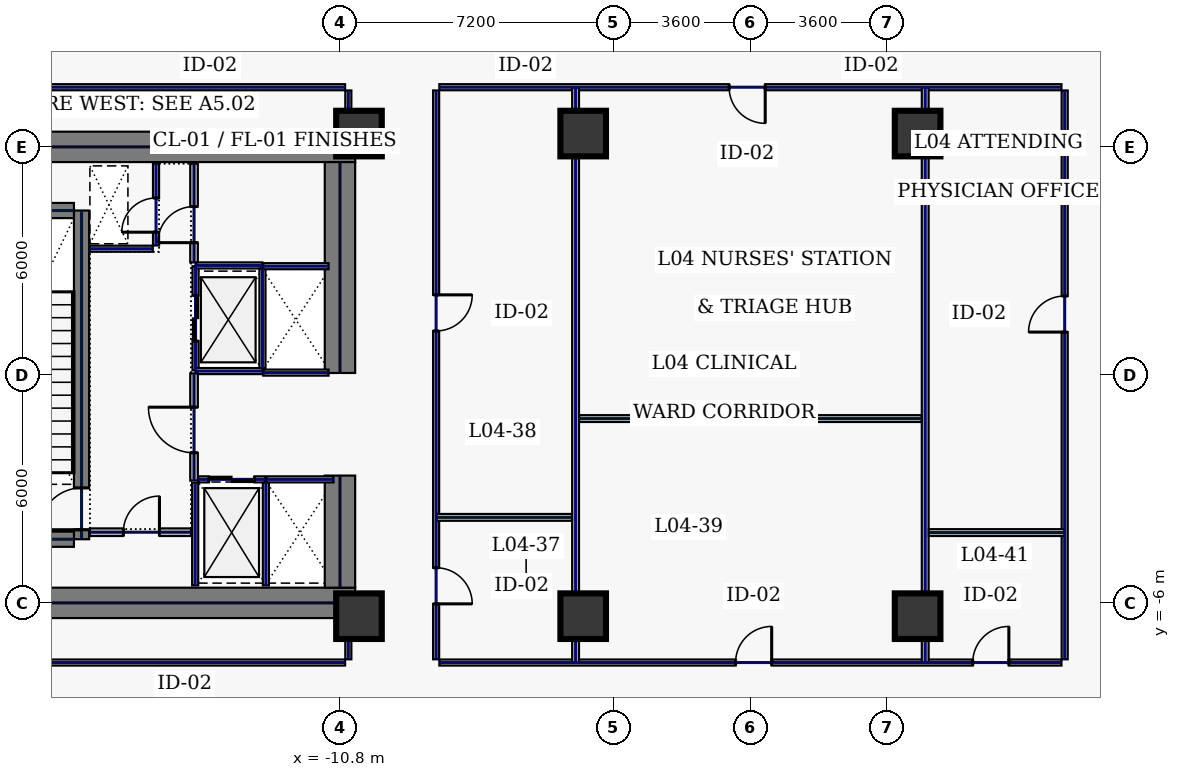
"""IFC4 building model, lengths in metres.
Left out: names, types, materials, properties, quantities, classifications, styles, units other than length and angle.
Written with IfcOpenShell. Run it as: python <this file> out.ifc"""

import sys

from ifc_helpers import new_model, si_unit, direction, frame, frame_2d, origin, origin_2d, place, context, subcontext, project, spatial, rectangle, hollow_rectangle, extrude, element, fill, save


model = new_model("IFC4")
c1 = context("Model", 3, precision=1e-05, world=origin(), true_north=direction((0.0, 1.0)))
c2 = subcontext(c1, "Body", "Model", "MODEL_VIEW")
j1 = project(units=[si_unit("LENGTHUNIT", "METRE"), si_unit("PLANEANGLEUNIT", "RADIAN")], contexts=[c1])
p1 = place(None, origin())
s1 = spatial("IfcSite", under=j1, at=p1, CompositionType="ELEMENT")
p2 = place(p1, origin())
s2 = spatial("IfcBuilding", under=s1, at=p2, CompositionType="ELEMENT")
p3 = place(p2, frame((0.0, 0.0, 23.4)))
s3 = spatial("IfcBuildingStorey", under=s2, at=p3, CompositionType="ELEMENT", Elevation=23.4)
for number, where, z_axis, x_axis in (
    (1, (-22.0, 6.0, 0.0), (0.0, 0.0, 1.0), (1.0, 0.0, 0.0)),
    (2, (-22.0, -6.0, 0.0), (0.0, 0.0, 1.0), (1.0, 0.0, 0.0)),
):
    element("IfcWall", number, at=place(p3, frame(where, z_axis=z_axis, x_axis=x_axis)), inside=s3, PredefinedType="SHEAR", context=c2, shape_type="SweptSolid", body=[
        extrude(rectangle(XDim=11.6, YDim=0.8, at=frame_2d((5.8, 0.0))), origin(), (0.0, 0.0, 1.0), 4.7),
    ])
p4 = place(p3, frame((-10.8, -5.6, 0.0), z_axis=(0.0, 0.0, 1.0), x_axis=(0.0, 1.0, 0.0)))
e3 = element("IfcWall", 3, at=p4, inside=s3, PredefinedType="SHEAR", context=c2, shape_type="SweptSolid", body=[
    extrude(rectangle(XDim=2.95, YDim=0.8, at=frame_2d((1.475, 0.0))), origin(), (0.0, 0.0, 1.0), 4.7),
])
p5 = place(p3, frame((-10.8, 0.05, 0.0), z_axis=(0.0, 0.0, 1.0), x_axis=(0.0, 1.0, 0.0)))
e4 = element("IfcWall", 4, at=p5, inside=s3, PredefinedType="SHEAR", context=c2, shape_type="SweptSolid", body=[
    extrude(rectangle(XDim=5.55, YDim=0.8, at=frame_2d((2.775, 0.0))), origin(), (0.0, 0.0, 1.0), 4.7),
])
p6 = place(p3, frame((-17.6, -4.325, 0.0), z_axis=(0.0, 0.0, 1.0), x_axis=(0.0, 1.0, 0.0)))
e5 = element("IfcWall", 5, at=p6, inside=s3, PredefinedType="SHEAR", context=c2, shape_type="SweptSolid", body=[
    extrude(rectangle(XDim=8.65, YDim=0.4, at=frame_2d((4.325, 0.0))), origin(), (0.0, 0.0, 1.0), 4.7),
])
p7 = place(p6, frame((0.25, 0.0, 0.0)))
e6 = element("IfcOpeningElement", 6, at=p7, cuts=e5, PredefinedType="OPENING", context=c2, shape_type="SweptSolid", body=[
    extrude(rectangle(XDim=1.1, YDim=2.2, at=frame_2d((0.55, 1.1))), frame((0.0, 0.21, 0.0), z_axis=(0.0, -1.0, 0.0), x_axis=(1.0, 0.0, 0.0)), (0.0, 0.0, 1.0), 0.42),
])
for number, where, z_axis, x_axis in (
    (7, (-21.2, -4.325, 0.0), (0.0, 0.0, 1.0), (1.0, 0.0, 0.0)),
    (8, (-21.2, 4.325, 0.0), (0.0, 0.0, 1.0), (1.0, 0.0, 0.0)),
):
    element("IfcWall", number, at=place(p3, frame(where, z_axis=z_axis, x_axis=x_axis)), inside=s3, PredefinedType="SHEAR", context=c2, shape_type="SweptSolid", body=[
        extrude(rectangle(XDim=3.4, YDim=0.4, at=frame_2d((1.7, 0.0))), origin(), (0.0, 0.0, 1.0), 4.7),
    ])
for number, where, z_axis, x_axis in (
    (9, (-10.3, -6.35, 0.0), (0.0, 0.0, 1.0), (1.0, 0.0, 0.0)),
    (10, (-10.3, 6.35, 0.0), (0.0, 0.0, 1.0), (1.0, 0.0, 0.0)),
    (11, (-4.4, -6.35, 0.0), (0.0, 0.0, 1.0), (1.0, 0.0, 0.0)),
    (12, (4.4, -6.35, 0.0), (0.0, 0.0, 1.0), (1.0, 0.0, 0.0)),
    (13, (-4.4, 6.35, 0.0), (0.0, 0.0, 1.0), (1.0, 0.0, 0.0)),
    (14, (4.4, 6.35, 0.0), (0.0, 0.0, 1.0), (1.0, 0.0, 0.0)),
):
    element("IfcColumn", number, at=place(p3, frame(where, z_axis=z_axis, x_axis=x_axis)), inside=s3, PredefinedType="COLUMN", context=c2, shape_type="SweptSolid", body=[
        extrude(hollow_rectangle(XDim=1.2, YDim=1.2, WallThickness=0.05, at=origin_2d()), origin(), (0.0, 0.0, 1.0), 4.7),
    ])
p8 = place(p3, frame((-14.6, 0.12, 0.0), z_axis=(0.0, 0.0, 1.0), x_axis=(0.0, 1.0, 0.0)))
e15 = element("IfcWall", 15, at=p8, inside=s3, PredefinedType="PARTITIONING", context=c2, shape_type="SweptSolid", body=[
    extrude(rectangle(XDim=2.74, YDim=0.16, at=frame_2d((1.37, 0.0))), origin(), (0.0, 0.0, 1.0), 4.7),
])
p9 = place(p8, frame((0.77, 0.0, 0.0)))
e16 = element("IfcOpeningElement", 16, at=p9, cuts=e15, PredefinedType="OPENING", context=c2, shape_type="SweptSolid", body=[
    extrude(rectangle(XDim=1.2, YDim=2.2, at=frame_2d((0.6, 1.1))), frame((0.0, 0.09, 0.0), z_axis=(0.0, -1.0, 0.0), x_axis=(1.0, 0.0, 0.0)), (0.0, 0.0, 1.0), 0.18),
])
for number, where, z_axis, x_axis in (
    (17, (-14.6, 0.1, 0.0), (0.0, 0.0, 1.0), (1.0, 0.0, 0.0)),
    (18, (-14.6, 2.88, 0.0), (0.0, 0.0, 1.0), (1.0, 0.0, 0.0)),
):
    element("IfcWall", number, at=place(p3, frame(where, z_axis=z_axis, x_axis=x_axis)), inside=s3, PredefinedType="PARTITIONING", context=c2, shape_type="SweptSolid", body=[
        extrude(rectangle(XDim=1.76, YDim=0.16, at=frame_2d((0.88, 0.0))), origin(), (0.0, 0.0, 1.0), 4.7),
    ])
p10 = place(p3, frame((-12.84, 0.18, 0.0), z_axis=(0.0, 0.0, 1.0), x_axis=(0.0, 1.0, 0.0)))
e19 = element("IfcWall", 19, at=p10, inside=s3, PredefinedType="PARTITIONING", context=c2, shape_type="SweptSolid", body=[
    extrude(rectangle(XDim=2.62, YDim=0.16, at=frame_2d((1.31, 0.0))), origin(), (0.0, 0.0, 1.0), 4.7),
])
p11 = place(p3, frame((-14.53, -2.75, 0.0), z_axis=(0.0, 0.0, 1.0), x_axis=(1.0, 0.0, 0.0)))
e20 = element("IfcWall", 20, at=p11, inside=s3, PredefinedType="PARTITIONING", context=c2, shape_type="SweptSolid", body=[
    extrude(rectangle(XDim=1.76, YDim=0.16, at=frame_2d((0.88, 0.0))), origin(), (0.0, 0.0, 1.0), 4.7),
])
p12 = place(p11, frame((0.28, 0.0, 0.0)))
e21 = element("IfcOpeningElement", 21, at=p12, cuts=e20, PredefinedType="OPENING", context=c2, shape_type="SweptSolid", body=[
    extrude(rectangle(XDim=1.2, YDim=2.2, at=frame_2d((0.6, 1.1))), frame((0.0, 0.09, 0.0), z_axis=(0.0, -1.0, 0.0), x_axis=(1.0, 0.0, 0.0)), (0.0, 0.0, 1.0), 0.18),
])
for number, where, z_axis, x_axis in (
    (22, (-12.75, -5.54, 0.0), (0.0, 0.0, 1.0), (0.0, 1.0, 0.0)),
    (23, (-14.61, -5.54, 0.0), (0.0, 0.0, 1.0), (0.0, 1.0, 0.0)),
):
    element("IfcWall", number, at=place(p3, frame(where, z_axis=z_axis, x_axis=x_axis)), inside=s3, PredefinedType="PARTITIONING", context=c2, shape_type="SweptSolid", body=[
        extrude(rectangle(XDim=2.7, YDim=0.16, at=frame_2d((1.35, 0.0))), origin(), (0.0, 0.0, 1.0), 4.7),
    ])
p13 = place(p3, frame((-12.73, -2.75, 0.0), z_axis=(0.0, 0.0, 1.0), x_axis=(1.0, 0.0, 0.0)))
e24 = element("IfcWall", 24, at=p13, inside=s3, PredefinedType="PARTITIONING", context=c2, shape_type="SweptSolid", body=[
    extrude(rectangle(XDim=1.76, YDim=0.16, at=frame_2d((0.88, 0.0))), origin(), (0.0, 0.0, 1.0), 4.7),
])
for number, where, z_axis, x_axis in (
    (25, (-12.82, 0.06, 0.0), (0.0, 0.0, 1.0), (1.0, 0.0, 0.0)),
    (26, (-12.82, 2.86, 0.0), (0.0, 0.0, 1.0), (1.0, 0.0, 0.0)),
):
    element("IfcWall", number, at=place(p3, frame(where, z_axis=z_axis, x_axis=x_axis)), inside=s3, PredefinedType="PARTITIONING", context=c2, shape_type="SweptSolid", body=[
        extrude(rectangle(XDim=1.72, YDim=0.16, at=frame_2d((0.86, 0.0))), origin(), (0.0, 0.0, 1.0), 4.7),
    ])
p14 = place(p3, frame((-15.64, 3.405, 0.0), z_axis=(0.0, 0.0, 1.0), x_axis=(0.0, 1.0, 0.0)))
e27 = element("IfcWall", 27, at=p14, inside=s3, PredefinedType="PARTITIONING", context=c2, shape_type="SweptSolid", body=[
    extrude(rectangle(XDim=2.155, YDim=0.16, at=frame_2d((1.078, 0.0))), origin(), (0.0, 0.0, 1.0), 4.7),
])
p15 = place(p14, frame((0.35, 0.0, 0.0)))
e28 = element("IfcOpeningElement", 28, at=p15, cuts=e27, PredefinedType="OPENING", context=c2, shape_type="SweptSolid", body=[
    extrude(rectangle(XDim=0.9, YDim=2.2, at=frame_2d((0.45, 1.1))), frame((0.0, 0.09, 0.0), z_axis=(0.0, -1.0, 0.0), x_axis=(1.0, 0.0, 0.0)), (0.0, 0.0, 1.0), 0.18),
])
p16 = place(p3, frame((-17.38, 3.32, 0.0), z_axis=(0.0, 0.0, 1.0), x_axis=(1.0, 0.0, 0.0)))
e29 = element("IfcWall", 29, at=p16, inside=s3, PredefinedType="PARTITIONING", context=c2, shape_type="SweptSolid", body=[
    extrude(rectangle(XDim=1.655, YDim=0.16, at=frame_2d((0.827, 0.0))), origin(), (0.0, 0.0, 1.0), 4.7),
])
p17 = place(p3, frame((-17.38, -4.14, 0.0), z_axis=(0.0, 0.0, 1.0), x_axis=(1.0, 0.0, 0.0)))
e30 = element("IfcWall", 30, at=p17, inside=s3, PredefinedType="SOLIDWALL", context=c2, shape_type="SweptSolid", body=[
    extrude(rectangle(XDim=2.66, YDim=0.2, at=frame_2d((1.33, 0.0))), origin(), (0.0, 0.0, 1.0), 4.7),
])
p18 = place(p17, frame((0.88, 0.0, 0.0)))
e31 = element("IfcOpeningElement", 31, at=p18, cuts=e30, PredefinedType="OPENING", context=c2, shape_type="SweptSolid", body=[
    extrude(rectangle(XDim=0.95, YDim=2.2, at=frame_2d((0.475, 1.1))), frame((0.0, 0.11, 0.0), z_axis=(0.0, -1.0, 0.0), x_axis=(1.0, 0.0, 0.0)), (0.0, 0.0, 1.0), 0.22),
])
p19 = place(p3, frame((-14.64, 2.96, 0.0), z_axis=(0.0, 0.0, 1.0), x_axis=(0.0, 1.0, 0.0)))
e32 = element("IfcWall", 32, at=p19, inside=s3, PredefinedType="SOLIDWALL", context=c2, shape_type="SweptSolid", body=[
    extrude(rectangle(XDim=2.6, YDim=0.2, at=frame_2d((1.3, 0.0))), origin(), (0.0, 0.0, 1.0), 4.7),
])
p20 = place(p19, frame((0.52, 0.0, 0.0)))
e33 = element("IfcOpeningElement", 33, at=p20, cuts=e32, PredefinedType="OPENING", context=c2, shape_type="SweptSolid", body=[
    extrude(rectangle(XDim=0.95, YDim=2.2, at=frame_2d((0.475, 1.1))), frame((0.0, 0.11, 0.0), z_axis=(0.0, -1.0, 0.0), x_axis=(1.0, 0.0, 0.0)), (0.0, 0.0, 1.0), 0.22),
])
p21 = place(p3, frame((-14.64, -2.78, 0.0), z_axis=(0.0, 0.0, 1.0), x_axis=(0.0, 1.0, 0.0)))
e34 = element("IfcWall", 34, at=p21, inside=s3, PredefinedType="SOLIDWALL", context=c2, shape_type="SweptSolid", body=[
    extrude(rectangle(XDim=2.82, YDim=0.2, at=frame_2d((1.41, 0.0))), origin(), (0.0, 0.0, 1.0), 4.7),
])
p22 = place(p21, frame((0.73, 0.0, 0.0)))
e35 = element("IfcOpeningElement", 35, at=p22, cuts=e34, PredefinedType="OPENING", context=c2, shape_type="SweptSolid", body=[
    extrude(rectangle(XDim=1.2, YDim=2.2, at=frame_2d((0.6, 1.1))), frame((0.0, 0.11, 0.0), z_axis=(0.0, -1.0, 0.0), x_axis=(1.0, 0.0, 0.0)), (0.0, 0.0, 1.0), 0.22),
])
p23 = place(p3, frame((8.185, 7.57, 0.0), z_axis=(0.0, 0.0, 1.0), x_axis=(-1.0, 0.0, 0.0)))
e36 = element("IfcWall", 36, at=p23, inside=s3, PredefinedType="PARTITIONING", context=c2, shape_type="SweptSolid", body=[
    extrude(rectangle(XDim=16.37, YDim=0.16, at=frame_2d((8.185, 0.0))), origin(), (0.0, 0.0, 1.0), 4.7),
])
p24 = place(p23, frame((7.795, 0.0, 0.0)))
e37 = element("IfcOpeningElement", 37, at=p24, cuts=e36, PredefinedType="OPENING", context=c2, shape_type="SweptSolid", body=[
    extrude(rectangle(XDim=0.95, YDim=2.2, at=frame_2d((0.475, 1.1))), frame((0.0, 0.09, 0.0), z_axis=(0.0, -1.0, 0.0), x_axis=(1.0, 0.0, 0.0)), (0.0, 0.0, 1.0), 0.18),
])
p25 = place(p3, frame((-8.27, 7.485, 0.0), z_axis=(0.0, 0.0, 1.0), x_axis=(0.0, -1.0, 0.0)))
e38 = element("IfcWall", 38, at=p25, inside=s3, PredefinedType="PARTITIONING", context=c2, shape_type="SweptSolid", body=[
    extrude(rectangle(XDim=14.97, YDim=0.16, at=frame_2d((7.485, 0.0))), origin(), (0.0, 0.0, 1.0), 4.7),
])
p26 = place(p25, frame((12.561, 0.0, 0.0)))
e39 = element("IfcOpeningElement", 39, at=p26, cuts=e38, PredefinedType="OPENING", context=c2, shape_type="SweptSolid", body=[
    extrude(rectangle(XDim=0.95, YDim=2.2, at=frame_2d((0.475, 1.1))), frame((0.0, 0.09, 0.0), z_axis=(0.0, -1.0, 0.0), x_axis=(1.0, 0.0, 0.0)), (0.0, 0.0, 1.0), 0.18),
])
p27 = place(p25, frame((5.379, 0.0, 0.0)))
e40 = element("IfcOpeningElement", 40, at=p27, cuts=e38, PredefinedType="OPENING", context=c2, shape_type="SweptSolid", body=[
    extrude(rectangle(XDim=0.95, YDim=2.2, at=frame_2d((0.475, 1.1))), frame((0.0, 0.09, 0.0), z_axis=(0.0, -1.0, 0.0), x_axis=(1.0, 0.0, 0.0)), (0.0, 0.0, 1.0), 0.18),
])
p28 = place(p3, frame((-8.185, -7.57, 0.0), z_axis=(0.0, 0.0, 1.0), x_axis=(1.0, 0.0, 0.0)))
e41 = element("IfcWall", 41, at=p28, inside=s3, PredefinedType="PARTITIONING", context=c2, shape_type="SweptSolid", body=[
    extrude(rectangle(XDim=16.37, YDim=0.16, at=frame_2d((8.185, 0.0))), origin(), (0.0, 0.0, 1.0), 4.7),
])
p29 = place(p28, frame((7.795, 0.0, 0.0)))
e42 = element("IfcOpeningElement", 42, at=p29, cuts=e41, PredefinedType="OPENING", context=c2, shape_type="SweptSolid", body=[
    extrude(rectangle(XDim=0.95, YDim=2.2, at=frame_2d((0.475, 1.1))), frame((0.0, 0.09, 0.0), z_axis=(0.0, -1.0, 0.0), x_axis=(1.0, 0.0, 0.0)), (0.0, 0.0, 1.0), 0.18),
])
p30 = place(p28, frame((14.036, 0.0, 0.0)))
e43 = element("IfcOpeningElement", 43, at=p30, cuts=e41, PredefinedType="OPENING", context=c2, shape_type="SweptSolid", body=[
    extrude(rectangle(XDim=0.95, YDim=2.2, at=frame_2d((0.475, 1.1))), frame((0.0, 0.09, 0.0), z_axis=(0.0, -1.0, 0.0), x_axis=(1.0, 0.0, 0.0)), (0.0, 0.0, 1.0), 0.18),
])
p31 = place(p3, frame((8.27, -7.485, 0.0), z_axis=(0.0, 0.0, 1.0), x_axis=(0.0, 1.0, 0.0)))
e44 = element("IfcWall", 44, at=p31, inside=s3, PredefinedType="PARTITIONING", context=c2, shape_type="SweptSolid", body=[
    extrude(rectangle(XDim=14.97, YDim=0.16, at=frame_2d((7.485, 0.0))), origin(), (0.0, 0.0, 1.0), 4.7),
])
p32 = place(p31, frame((8.611, 0.0, 0.0)))
e45 = element("IfcOpeningElement", 45, at=p32, cuts=e44, PredefinedType="OPENING", context=c2, shape_type="SweptSolid", body=[
    extrude(rectangle(XDim=0.95, YDim=2.2, at=frame_2d((0.475, 1.1))), frame((0.0, 0.09, 0.0), z_axis=(0.0, -1.0, 0.0), x_axis=(1.0, 0.0, 0.0)), (0.0, 0.0, 1.0), 0.18),
])
for number, where, z_axis, x_axis in (
    (46, (-10.58, -7.485, 0.0), (0.0, 0.0, 1.0), (0.0, 1.0, 0.0)),
    (47, (-10.58, 6.42, 0.0), (0.0, 0.0, 1.0), (0.0, 1.0, 0.0)),
):
    element("IfcWall", number, at=place(p3, frame(where, z_axis=z_axis, x_axis=x_axis)), inside=s3, PredefinedType="PARTITIONING", context=c2, shape_type="SweptSolid", body=[
        extrude(rectangle(XDim=1.065, YDim=0.16, at=frame_2d((0.533, 0.0))), origin(), (0.0, 0.0, 1.0), 4.7),
    ])
for number, where, z_axis, x_axis in (
    (48, (-10.665, 7.57, 0.0), (0.0, 0.0, 1.0), (-1.0, 0.0, 0.0)),
    (49, (-27.185, -7.57, 0.0), (0.0, 0.0, 1.0), (1.0, 0.0, 0.0)),
):
    element("IfcWall", number, at=place(p3, frame(where, z_axis=z_axis, x_axis=x_axis)), inside=s3, PredefinedType="PARTITIONING", context=c2, shape_type="SweptSolid", body=[
        extrude(rectangle(XDim=16.52, YDim=0.16, at=frame_2d((8.26, 0.0))), origin(), (0.0, 0.0, 1.0), 4.7),
    ])
for number, where, z_axis, x_axis in (
    (50, (-4.6, -7.565, 0.0), (0.0, 0.0, 1.0), (0.0, 1.0, 0.0)),
    (51, (4.6, -7.565, 0.0), (0.0, 0.0, 1.0), (0.0, 1.0, 0.0)),
):
    element("IfcWall", number, at=place(p3, frame(where, z_axis=z_axis, x_axis=x_axis)), inside=s3, PredefinedType="PARTITIONING", context=c2, shape_type="SweptSolid", body=[
        extrude(rectangle(XDim=15.13, YDim=0.18, at=frame_2d((7.565, 0.0))), origin(), (0.0, 0.0, 1.0), 3.895),
    ])
p33 = place(p3, frame((-4.505, -1.15, 0.0), z_axis=(0.0, 0.0, 1.0), x_axis=(1.0, 0.0, 0.0)))
e52 = element("IfcWall", 52, at=p33, inside=s3, PredefinedType="PARTITIONING", context=c2, shape_type="SweptSolid", body=[
    extrude(rectangle(XDim=9.01, YDim=0.18, at=frame_2d((4.505, 0.0))), origin(), (0.0, 0.0, 1.0), 4.7),
])
for number, where, z_axis, x_axis in (
    (53, (-8.265, -3.75, 0.0), (0.0, 0.0, 1.0), (1.0, 0.0, 0.0)),
    (54, (4.695, -4.15, 0.0), (0.0, 0.0, 1.0), (1.0, 0.0, 0.0)),
):
    element("IfcWall", number, at=place(p3, frame(where, z_axis=z_axis, x_axis=x_axis)), inside=s3, PredefinedType="PARTITIONING", context=c2, shape_type="SweptSolid", body=[
        extrude(rectangle(XDim=3.57, YDim=0.18, at=frame_2d((1.785, 0.0))), origin(), (0.0, 0.0, 1.0), 4.7),
    ])
p34 = place(p7, origin())
e55 = element("IfcDoor", 55, at=p34, inside=s3, OperationType="SINGLE_SWING_LEFT", PredefinedType="DOOR", context=c2, shape_type="SweptSolid", body=[
    extrude(rectangle(XDim=1.1, YDim=2.2, at=frame_2d((0.55, 1.1))), frame((0.0, 0.025, 0.0), z_axis=(0.0, -1.0, 0.0), x_axis=(1.0, 0.0, 0.0)), (0.0, 0.0, 1.0), 0.05),
])
fill(e6, e55)
p35 = place(p9, origin())
e56 = element("IfcDoor", 56, at=p35, inside=s3, OperationType="SLIDING_TO_LEFT", PredefinedType="DOOR", context=c2, shape_type="SweptSolid", body=[
    extrude(rectangle(XDim=1.2, YDim=2.2, at=frame_2d((0.6, 1.1))), frame((0.0, 0.025, 0.0), z_axis=(0.0, -1.0, 0.0), x_axis=(1.0, 0.0, 0.0)), (0.0, 0.0, 1.0), 0.05),
])
fill(e16, e56)
p36 = place(p12, origin())
e57 = element("IfcDoor", 57, at=p36, inside=s3, OperationType="SLIDING_TO_LEFT", PredefinedType="DOOR", context=c2, shape_type="SweptSolid", body=[
    extrude(rectangle(XDim=1.2, YDim=2.2, at=frame_2d((0.6, 1.1))), frame((0.0, 0.025, 0.0), z_axis=(0.0, -1.0, 0.0), x_axis=(1.0, 0.0, 0.0)), (0.0, 0.0, 1.0), 0.05),
])
fill(e21, e57)
p37 = place(p15, origin())
e58 = element("IfcDoor", 58, at=p37, inside=s3, OperationType="SINGLE_SWING_LEFT", PredefinedType="DOOR", context=c2, shape_type="SweptSolid", body=[
    extrude(rectangle(XDim=0.9, YDim=2.2, at=frame_2d((0.45, 1.1))), frame((0.0, 0.025, 0.0), z_axis=(0.0, -1.0, 0.0), x_axis=(1.0, 0.0, 0.0)), (0.0, 0.0, 1.0), 0.05),
])
fill(e28, e58)
p38 = place(p18, origin())
e59 = element("IfcDoor", 59, at=p38, inside=s3, OperationType="SINGLE_SWING_RIGHT", PredefinedType="DOOR", context=c2, shape_type="SweptSolid", body=[
    extrude(rectangle(XDim=0.95, YDim=2.2, at=frame_2d((0.475, 1.1))), frame((0.0, 0.025, 0.0), z_axis=(0.0, -1.0, 0.0), x_axis=(1.0, 0.0, 0.0)), (0.0, 0.0, 1.0), 0.05),
])
fill(e31, e59)
p39 = place(p20, origin())
e60 = element("IfcDoor", 60, at=p39, inside=s3, OperationType="SINGLE_SWING_LEFT", PredefinedType="DOOR", context=c2, shape_type="SweptSolid", body=[
    extrude(rectangle(XDim=0.95, YDim=2.2, at=frame_2d((0.475, 1.1))), frame((0.0, 0.025, 0.0), z_axis=(0.0, -1.0, 0.0), x_axis=(1.0, 0.0, 0.0)), (0.0, 0.0, 1.0), 0.05),
])
fill(e33, e60)
p40 = place(p22, origin())
e61 = element("IfcDoor", 61, at=p40, inside=s3, OperationType="SINGLE_SWING_RIGHT", PredefinedType="DOOR", context=c2, shape_type="SweptSolid", body=[
    extrude(rectangle(XDim=1.2, YDim=2.2, at=frame_2d((0.6, 1.1))), frame((0.0, 0.025, 0.0), z_axis=(0.0, -1.0, 0.0), x_axis=(1.0, 0.0, 0.0)), (0.0, 0.0, 1.0), 0.05),
])
fill(e35, e61)
p41 = place(p26, origin())
e62 = element("IfcDoor", 62, at=p41, inside=s3, OperationType="SINGLE_SWING_RIGHT", PredefinedType="DOOR", context=c2, shape_type="SweptSolid", body=[
    extrude(rectangle(XDim=0.95, YDim=2.2, at=frame_2d((0.475, 1.1))), frame((0.0, 0.025, 0.0), z_axis=(0.0, -1.0, 0.0), x_axis=(1.0, 0.0, 0.0)), (0.0, 0.0, 1.0), 0.05),
])
fill(e39, e62)
p42 = place(p27, origin())
e63 = element("IfcDoor", 63, at=p42, inside=s3, OperationType="SINGLE_SWING_LEFT", PredefinedType="DOOR", context=c2, shape_type="SweptSolid", body=[
    extrude(rectangle(XDim=0.95, YDim=2.2, at=frame_2d((0.475, 1.1))), frame((0.0, 0.025, 0.0), z_axis=(0.0, -1.0, 0.0), x_axis=(1.0, 0.0, 0.0)), (0.0, 0.0, 1.0), 0.05),
])
fill(e40, e63)
p43 = place(p29, origin())
e64 = element("IfcDoor", 64, at=p43, inside=s3, OperationType="SINGLE_SWING_RIGHT", PredefinedType="DOOR", context=c2, shape_type="SweptSolid", body=[
    extrude(rectangle(XDim=0.95, YDim=2.2, at=frame_2d((0.475, 1.1))), frame((0.0, 0.025, 0.0), z_axis=(0.0, -1.0, 0.0), x_axis=(1.0, 0.0, 0.0)), (0.0, 0.0, 1.0), 0.05),
])
fill(e42, e64)
p44 = place(p24, origin())
e65 = element("IfcDoor", 65, at=p44, inside=s3, OperationType="SINGLE_SWING_LEFT", PredefinedType="DOOR", context=c2, shape_type="SweptSolid", body=[
    extrude(rectangle(XDim=0.95, YDim=2.2, at=frame_2d((0.475, 1.1))), frame((0.0, 0.025, 0.0), z_axis=(0.0, -1.0, 0.0), x_axis=(1.0, 0.0, 0.0)), (0.0, 0.0, 1.0), 0.05),
])
fill(e37, e65)
p45 = place(p30, origin())
e66 = element("IfcDoor", 66, at=p45, inside=s3, OperationType="SINGLE_SWING_RIGHT", PredefinedType="DOOR", context=c2, shape_type="SweptSolid", body=[
    extrude(rectangle(XDim=0.95, YDim=2.2, at=frame_2d((0.475, 1.1))), frame((0.0, 0.025, 0.0), z_axis=(0.0, -1.0, 0.0), x_axis=(1.0, 0.0, 0.0)), (0.0, 0.0, 1.0), 0.05),
])
fill(e43, e66)
p46 = place(p32, origin())
e67 = element("IfcDoor", 67, at=p46, inside=s3, OperationType="SINGLE_SWING_LEFT", PredefinedType="DOOR", context=c2, shape_type="SweptSolid", body=[
    extrude(rectangle(XDim=0.95, YDim=2.2, at=frame_2d((0.475, 1.1))), frame((0.0, 0.025, 0.0), z_axis=(0.0, -1.0, 0.0), x_axis=(1.0, 0.0, 0.0)), (0.0, 0.0, 1.0), 0.05),
])
fill(e45, e67)
save(model, sys.argv[1])
